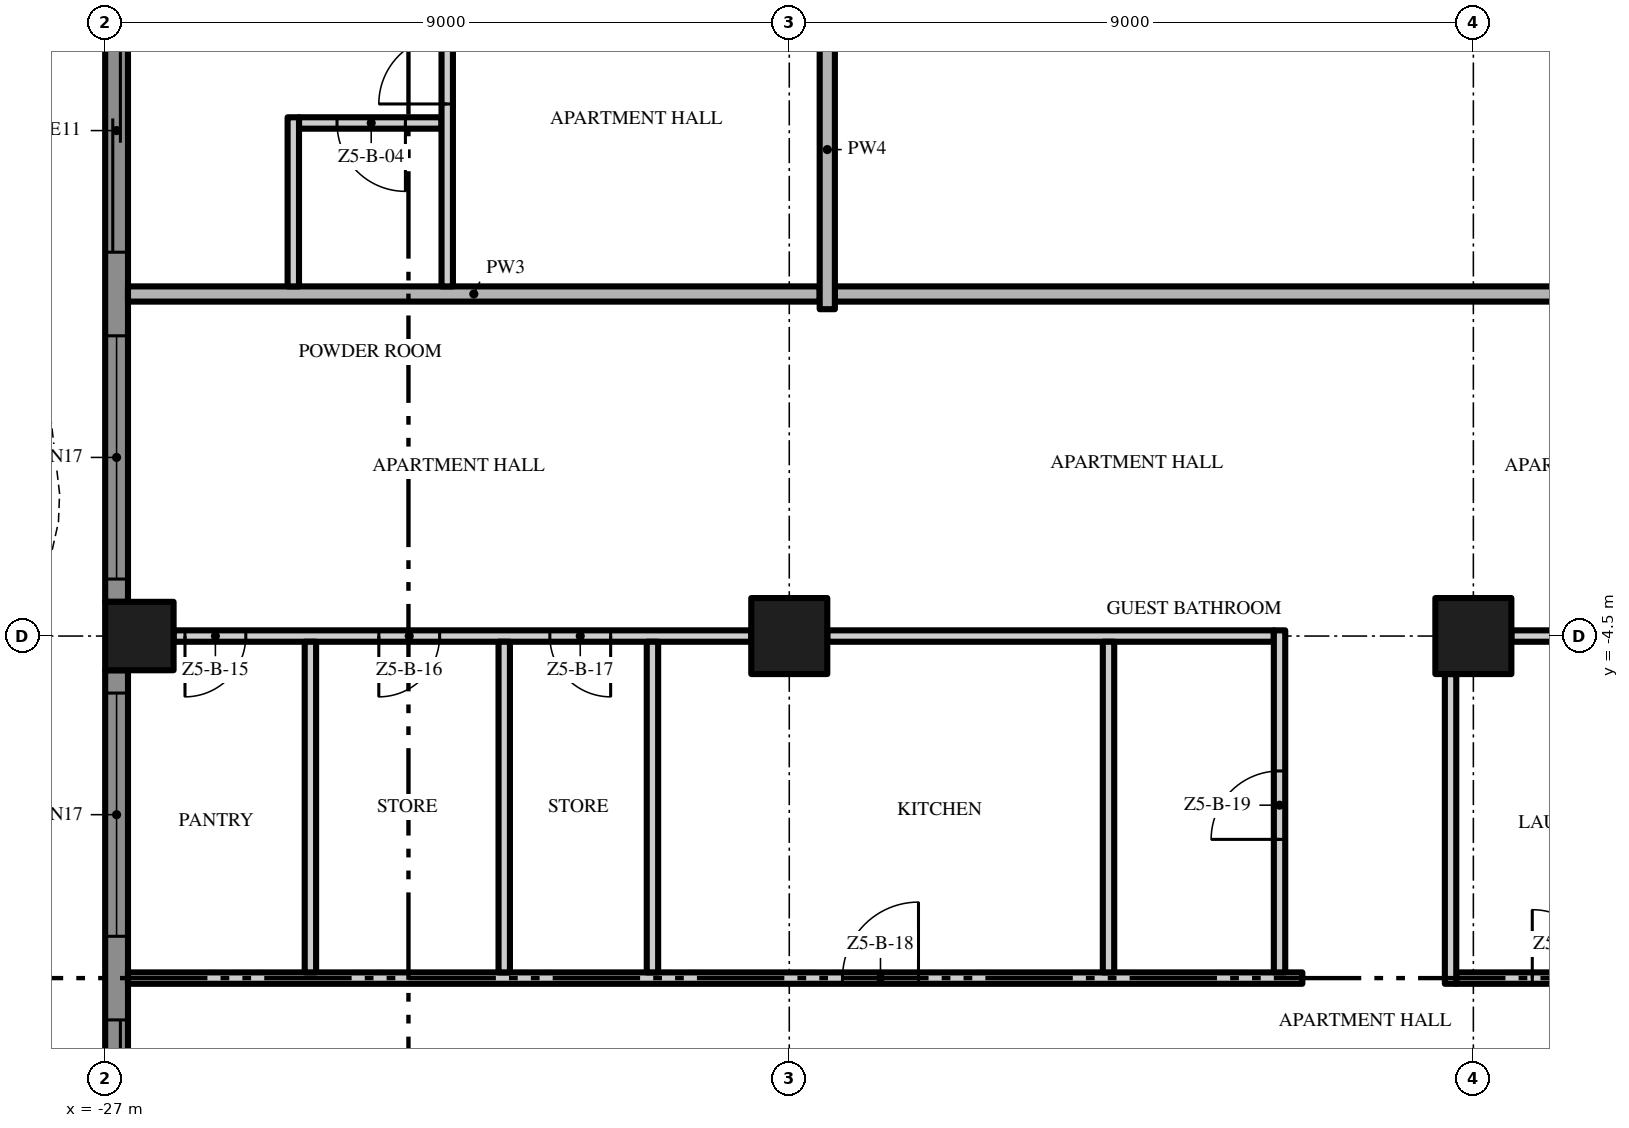
"""IFC4 building model, lengths in metres.
Left out: names, types, materials, properties, quantities, classifications, styles, units other than length and angle.
Written with IfcOpenShell. Run it as: python <this file> out.ifc"""

import sys

from ifc_helpers import new_model, si_unit, direction, frame, frame_2d, origin, origin_2d, place, context, subcontext, project, spatial, polyline, rectangle, outline, extrude, element, fill, save


model = new_model("IFC4")
c1 = context("Model", 3, precision=1e-05, world=origin(), true_north=direction((0.0, 1.0)))
c2 = subcontext(c1, "Body", "Model", "MODEL_VIEW")
j1 = project(units=[si_unit("LENGTHUNIT", "METRE"), si_unit("PLANEANGLEUNIT", "RADIAN")], contexts=[c1])
p1 = place(None, origin())
s1 = spatial("IfcSite", under=j1, at=p1, CompositionType="ELEMENT")
p2 = place(p1, origin())
s2 = spatial("IfcBuilding", under=s1, at=p2, CompositionType="ELEMENT")
p3 = place(p2, frame((0.0, 0.0, 254.0)))
s3 = spatial("IfcBuildingStorey", under=s2, at=p3, CompositionType="ELEMENT", Elevation=254.0)
p4 = place(p3, frame((-18.0, -4.5, 0.0), z_axis=(0.0, 0.0, 1.0), x_axis=(1.0, 0.0, 0.0)))
e1 = element("IfcColumn", 1, at=p4, inside=s3, PredefinedType="COLUMN", context=c2, shape_type="SweptSolid", body=[
    extrude(rectangle(XDim=1.0, YDim=1.0, at=origin_2d()), origin(), (0.0, 0.0, 1.0), 3.5),
])
p5 = place(p3, frame((-26.55, -4.5, 0.0), z_axis=(0.0, 0.0, 1.0), x_axis=(1.0, 0.0, 0.0)))
e2 = element("IfcColumn", 2, at=p5, inside=s3, PredefinedType="COLUMN", context=c2, shape_type="SweptSolid", body=[
    extrude(rectangle(XDim=0.9, YDim=0.9, at=origin_2d()), origin(), (0.0, 0.0, 1.0), 3.5),
])
p6 = place(p3, frame((-9.0, -4.5, 0.0), z_axis=(0.0, 0.0, 1.0), x_axis=(1.0, 0.0, 0.0)))
e3 = element("IfcColumn", 3, at=p6, inside=s3, PredefinedType="COLUMN", context=c2, shape_type="SweptSolid", body=[
    extrude(rectangle(XDim=1.0, YDim=1.0, at=origin_2d()), origin(), (0.0, 0.0, 1.0), 3.5),
])
p7 = place(p3, frame((-26.85, -4.05, 0.0), z_axis=(0.0, 0.0, 1.0), x_axis=(0.0, 1.0, 0.0)))
e4 = element("IfcWall", 4, at=p7, inside=s3, PredefinedType="SOLIDWALL", context=c2, shape_type="SweptSolid", body=[
    extrude(rectangle(XDim=8.1, YDim=0.3, at=frame_2d((4.05, 0.0))), origin(), (0.0, 0.0, 1.0), 3.5),
])
p8 = place(p7, frame((4.6, 0.0, 0.0)))
e5 = element("IfcOpeningElement", 5, at=p8, cuts=e4, PredefinedType="OPENING", context=c2, shape_type="SweptSolid", body=[
    extrude(rectangle(XDim=3.2, YDim=2.4, at=frame_2d((1.6, 1.2))), frame((0.0, 0.16, 0.0), z_axis=(0.0, -1.0, 0.0), x_axis=(1.0, 0.0, 0.0)), (0.0, 0.0, 1.0), 0.32),
])
p9 = place(p7, frame((0.3, 0.0, 0.45)))
e6 = element("IfcOpeningElement", 6, at=p9, cuts=e4, PredefinedType="OPENING", context=c2, shape_type="SweptSolid", body=[
    extrude(rectangle(XDim=3.2, YDim=2.65, at=frame_2d((1.6, 1.325))), frame((0.0, 0.16, 0.0), z_axis=(0.0, -1.0, 0.0), x_axis=(1.0, 0.0, 0.0)), (0.0, 0.0, 1.0), 0.32),
])
p10 = place(p3, frame((-26.85, -13.05, 0.0), z_axis=(0.0, 0.0, 1.0), x_axis=(0.0, 1.0, 0.0)))
e7 = element("IfcWall", 7, at=p10, inside=s3, PredefinedType="SOLIDWALL", context=c2, shape_type="SweptSolid", body=[
    extrude(rectangle(XDim=8.1, YDim=0.3, at=frame_2d((4.05, 0.0))), origin(), (0.0, 0.0, 1.0), 3.5),
])
p11 = place(p10, frame((4.6, 0.0, 0.45)))
e8 = element("IfcOpeningElement", 8, at=p11, cuts=e7, PredefinedType="OPENING", context=c2, shape_type="SweptSolid", body=[
    extrude(rectangle(XDim=3.2, YDim=2.65, at=frame_2d((1.6, 1.325))), frame((0.0, 0.16, 0.0), z_axis=(0.0, -1.0, 0.0), x_axis=(1.0, 0.0, 0.0)), (0.0, 0.0, 1.0), 0.32),
])
p12 = place(p10, frame((0.3, 0.0, 0.0)))
e9 = element("IfcOpeningElement", 9, at=p12, cuts=e7, PredefinedType="OPENING", context=c2, shape_type="SweptSolid", body=[
    extrude(rectangle(XDim=3.2, YDim=2.4, at=frame_2d((1.6, 1.2))), frame((0.0, 0.16, 0.0), z_axis=(0.0, -1.0, 0.0), x_axis=(1.0, 0.0, 0.0)), (0.0, 0.0, 1.0), 0.32),
])
p13 = place(p3, origin())
e10 = element("IfcWall", 10, at=p13, inside=s3, PredefinedType="USERDEFINED", context=c2, shape_type="SweptSolid", body=[
    extrude(outline(polyline([(-29.649, 18.0), (-28.988, 16.5), (-28.255, 15.0), (-27.731, 13.5), (-27.6, 12.375), (-27.615, 12.0), (-27.951, 10.5), (-28.612, 9.0), (-29.345, 7.5), (-29.869, 6.0), (-30.0, 4.875), (-29.985, 4.5), (-29.649, 3.0), (-28.988, 1.5), (-28.255, 0.0), (-27.731, -1.5), (-27.6, -2.625), (-27.615, -3.0), (-27.951, -4.5), (-28.612, -6.0), (-29.345, -7.5), (-29.869, -9.0), (-30.0, -10.125), (-29.985, -10.5), (-29.649, -12.0), (-28.988, -13.5), (-28.255, -15.0), (-27.731, -16.5), (-27.6, -17.625), (-27.615, -18.0), (-27.365, -18.01), (-27.349, -17.615), (-27.486, -16.444), (-28.024, -14.904), (-28.761, -13.395), (-29.41, -11.921), (-29.736, -10.467), (-29.749, -10.135), (-29.624, -9.056), (-29.114, -7.596), (-28.385, -6.105), (-27.713, -4.579), (-27.366, -3.033), (-27.349, -2.615), (-27.486, -1.444), (-28.024, 0.096), (-28.761, 1.605), (-29.41, 3.079), (-29.736, 4.533), (-29.749, 4.865), (-29.624, 5.944), (-29.114, 7.404), (-28.385, 8.895), (-27.713, 10.421), (-27.366, 11.967), (-27.349, 12.385), (-27.486, 13.556), (-28.024, 15.096), (-28.761, 16.605), (-29.42, 18.101), (-29.649, 18.0)])), origin(), (0.0, 0.0, 1.0), 0.9),
])
p14 = place(p3, frame((-26.7, -9.0, 0.0), z_axis=(0.0, 0.0, 1.0), x_axis=(1.0, 0.0, 0.0)))
e11 = element("IfcWall", 11, at=p14, inside=s3, PredefinedType="PARTITIONING", context=c2, shape_type="SweptSolid", body=[
    extrude(rectangle(XDim=15.45, YDim=0.15, at=frame_2d((7.725, 0.0))), origin(), (0.0, 0.0, 1.0), 3.5),
])
p15 = place(p14, frame((9.4, 0.0, 0.0)))
e12 = element("IfcOpeningElement", 12, at=p15, cuts=e11, PredefinedType="OPENING", context=c2, shape_type="SweptSolid", body=[
    extrude(rectangle(XDim=1.0, YDim=2.4, at=frame_2d((0.5, 1.2))), frame((0.0, 0.085, 0.0), z_axis=(0.0, -1.0, 0.0), x_axis=(1.0, 0.0, 0.0)), (0.0, 0.0, 1.0), 0.17),
])
p16 = place(p3, frame((-9.225, -9.0, 0.0), z_axis=(0.0, 0.0, 1.0), x_axis=(1.0, 0.0, 0.0)))
e13 = element("IfcWall", 13, at=p16, inside=s3, PredefinedType="PARTITIONING", context=c2, shape_type="SweptSolid", body=[
    extrude(rectangle(XDim=13.625, YDim=0.15, at=frame_2d((6.812, 0.0))), origin(), (0.0, 0.0, 1.0), 3.5),
])
p17 = place(p16, frame((1.0, 0.0, 0.0)))
e14 = element("IfcOpeningElement", 14, at=p17, cuts=e13, PredefinedType="OPENING", context=c2, shape_type="SweptSolid", body=[
    extrude(rectangle(XDim=0.9, YDim=2.1, at=frame_2d((0.45, 1.05))), frame((0.0, 0.085, 0.0), z_axis=(0.0, -1.0, 0.0), x_axis=(1.0, 0.0, 0.0)), (0.0, 0.0, 1.0), 0.17),
])
p18 = place(p16, frame((5.125, 0.0, 0.0)))
e15 = element("IfcOpeningElement", 15, at=p18, cuts=e13, PredefinedType="OPENING", context=c2, shape_type="SweptSolid", body=[
    extrude(rectangle(XDim=0.9, YDim=2.1, at=frame_2d((0.45, 1.05))), frame((0.0, 0.085, 0.0), z_axis=(0.0, -1.0, 0.0), x_axis=(1.0, 0.0, 0.0)), (0.0, 0.0, 1.0), 0.17),
])
p19 = place(p3, frame((-18.5, -4.5, 0.0), z_axis=(0.0, 0.0, 1.0), x_axis=(-1.0, 0.0, 0.0)))
e16 = element("IfcWall", 16, at=p19, inside=s3, PredefinedType="PARTITIONING", context=c2, shape_type="SweptSolid", body=[
    extrude(rectangle(XDim=7.6, YDim=0.15, at=frame_2d((3.8, 0.0))), origin(), (0.0, 0.0, 1.0), 3.5),
])
p20 = place(p19, frame((6.65, 0.0, 0.0)))
e17 = element("IfcOpeningElement", 17, at=p20, cuts=e16, PredefinedType="OPENING", context=c2, shape_type="SweptSolid", body=[
    extrude(rectangle(XDim=0.8, YDim=2.0, at=frame_2d((0.4, 1.0))), frame((0.0, 0.085, 0.0), z_axis=(0.0, -1.0, 0.0), x_axis=(1.0, 0.0, 0.0)), (0.0, 0.0, 1.0), 0.17),
])
p21 = place(p19, frame((4.1, 0.0, 0.0)))
e18 = element("IfcOpeningElement", 18, at=p21, cuts=e16, PredefinedType="OPENING", context=c2, shape_type="SweptSolid", body=[
    extrude(rectangle(XDim=0.8, YDim=2.0, at=frame_2d((0.4, 1.0))), frame((0.0, 0.085, 0.0), z_axis=(0.0, -1.0, 0.0), x_axis=(1.0, 0.0, 0.0)), (0.0, 0.0, 1.0), 0.17),
])
p22 = place(p19, frame((1.85, 0.0, 0.0)))
e19 = element("IfcOpeningElement", 19, at=p22, cuts=e16, PredefinedType="OPENING", context=c2, shape_type="SweptSolid", body=[
    extrude(rectangle(XDim=0.8, YDim=2.0, at=frame_2d((0.4, 1.0))), frame((0.0, 0.085, 0.0), z_axis=(0.0, -1.0, 0.0), x_axis=(1.0, 0.0, 0.0)), (0.0, 0.0, 1.0), 0.17),
])
p23 = place(p3, frame((-17.5, -4.5, 0.0), z_axis=(0.0, 0.0, 1.0), x_axis=(1.0, 0.0, 0.0)))
e20 = element("IfcWall", 20, at=p23, inside=s3, PredefinedType="PARTITIONING", context=c2, shape_type="SweptSolid", body=[
    extrude(rectangle(XDim=5.875, YDim=0.15, at=frame_2d((2.938, 0.0))), origin(), (0.0, 0.0, 1.0), 3.5),
])
p24 = place(p3, frame((-8.5, -4.5, 0.0), z_axis=(0.0, 0.0, 1.0), x_axis=(1.0, 0.0, 0.0)))
e21 = element("IfcWall", 21, at=p24, inside=s3, PredefinedType="PARTITIONING", context=c2, shape_type="SweptSolid", body=[
    extrude(rectangle(XDim=8.0, YDim=0.15, at=frame_2d((4.0, 0.0))), origin(), (0.0, 0.0, 1.0), 3.5),
])
p25 = place(p3, frame((17.4, 0.0, 0.0), z_axis=(0.0, 0.0, 1.0), x_axis=(-1.0, 0.0, 0.0)))
e22 = element("IfcWall", 22, at=p25, inside=s3, PredefinedType="PARTITIONING", context=c2, shape_type="SweptSolid", body=[
    extrude(rectangle(XDim=34.8, YDim=0.2, at=frame_2d((17.4, 0.0))), origin(), (0.0, 0.0, 1.0), 3.5),
])
p26 = place(p25, frame((23.4, 0.0, 0.0)))
e23 = element("IfcOpeningElement", 23, at=p26, cuts=e22, PredefinedType="OPENING", context=c2, shape_type="SweptSolid", body=[
    extrude(rectangle(XDim=1.5, YDim=2.4, at=frame_2d((0.75, 1.2))), frame((0.0, 0.11, 0.0), z_axis=(0.0, -1.0, 0.0), x_axis=(1.0, 0.0, 0.0)), (0.0, 0.0, 1.0), 0.22),
])
p27 = place(p25, frame((5.4, 0.0, 0.0)))
e24 = element("IfcOpeningElement", 24, at=p27, cuts=e22, PredefinedType="OPENING", context=c2, shape_type="SweptSolid", body=[
    extrude(rectangle(XDim=1.5, YDim=2.4, at=frame_2d((0.75, 1.2))), frame((0.0, 0.11, 0.0), z_axis=(0.0, -1.0, 0.0), x_axis=(1.0, 0.0, 0.0)), (0.0, 0.0, 1.0), 0.22),
])
p28 = place(p3, frame((-26.7, 0.0, 0.0), z_axis=(0.0, 0.0, 1.0), x_axis=(1.0, 0.0, 0.0)))
e25 = element("IfcWall", 25, at=p28, inside=s3, PredefinedType="PARTITIONING", context=c2, shape_type="SweptSolid", body=[
    extrude(rectangle(XDim=9.1, YDim=0.2, at=frame_2d((4.55, 0.0))), origin(), (0.0, 0.0, 1.0), 3.5),
])
p29 = place(p3, frame((-22.575, 2.25, 0.0), z_axis=(0.0, 0.0, 1.0), x_axis=(-1.0, 0.0, 0.0)))
e26 = element("IfcWall", 26, at=p29, inside=s3, PredefinedType="PARTITIONING", context=c2, shape_type="SweptSolid", body=[
    extrude(rectangle(XDim=1.875, YDim=0.15, at=frame_2d((0.938, 0.0))), origin(), (0.0, 0.0, 1.0), 3.5),
])
p30 = place(p29, frame((0.475, 0.0, 0.0)))
e27 = element("IfcOpeningElement", 27, at=p30, cuts=e26, PredefinedType="OPENING", context=c2, shape_type="SweptSolid", body=[
    extrude(rectangle(XDim=0.9, YDim=2.1, at=frame_2d((0.45, 1.05))), frame((0.0, 0.085, 0.0), z_axis=(0.0, -1.0, 0.0), x_axis=(1.0, 0.0, 0.0)), (0.0, 0.0, 1.0), 0.17),
])
p31 = place(p3, frame((-24.525, 0.1, 0.0), z_axis=(0.0, 0.0, 1.0), x_axis=(0.0, 1.0, 0.0)))
e28 = element("IfcWall", 28, at=p31, inside=s3, PredefinedType="PARTITIONING", context=c2, shape_type="SweptSolid", body=[
    extrude(rectangle(XDim=2.225, YDim=0.15, at=frame_2d((1.113, 0.0))), origin(), (0.0, 0.0, 1.0), 3.5),
])
p32 = place(p3, frame((-24.3, -8.925, 0.0), z_axis=(0.0, 0.0, 1.0), x_axis=(0.0, 1.0, 0.0)))
e29 = element("IfcWall", 29, at=p32, inside=s3, PredefinedType="PARTITIONING", context=c2, shape_type="SweptSolid", body=[
    extrude(rectangle(XDim=4.35, YDim=0.15, at=frame_2d((2.175, 0.0))), origin(), (0.0, 0.0, 1.0), 3.5),
])
p33 = place(p3, frame((-22.5, 0.1, 0.0), z_axis=(0.0, 0.0, 1.0), x_axis=(0.0, 1.0, 0.0)))
e30 = element("IfcWall", 30, at=p33, inside=s3, PredefinedType="PARTITIONING", context=c2, shape_type="SweptSolid", body=[
    extrude(rectangle(XDim=17.45, YDim=0.15, at=frame_2d((8.725, 0.0))), origin(), (0.0, 0.0, 1.0), 3.5),
])
p34 = place(p33, frame((2.4, 0.0, 0.0)))
e31 = element("IfcOpeningElement", 31, at=p34, cuts=e30, PredefinedType="OPENING", context=c2, shape_type="SweptSolid", body=[
    extrude(rectangle(XDim=1.8, YDim=2.4, at=frame_2d((0.9, 1.2))), frame((0.0, 0.085, 0.0), z_axis=(0.0, -1.0, 0.0), x_axis=(1.0, 0.0, 0.0)), (0.0, 0.0, 1.0), 0.17),
])
p35 = place(p33, frame((10.65, 0.0, 0.0)))
e32 = element("IfcOpeningElement", 32, at=p35, cuts=e30, PredefinedType="OPENING", context=c2, shape_type="SweptSolid", body=[
    extrude(rectangle(XDim=1.0, YDim=2.4, at=frame_2d((0.5, 1.2))), frame((0.0, 0.085, 0.0), z_axis=(0.0, -1.0, 0.0), x_axis=(1.0, 0.0, 0.0)), (0.0, 0.0, 1.0), 0.17),
])
for number, where, z_axis, x_axis in (
    (33, (-21.75, -8.925, 0.0), (0.0, 0.0, 1.0), (0.0, 1.0, 0.0)),
    (34, (-19.8, -8.925, 0.0), (0.0, 0.0, 1.0), (0.0, 1.0, 0.0)),
):
    element("IfcWall", number, at=place(p3, frame(where, z_axis=z_axis, x_axis=x_axis)), inside=s3, PredefinedType="PARTITIONING", context=c2, shape_type="SweptSolid", body=[
        extrude(rectangle(XDim=4.35, YDim=0.15, at=frame_2d((2.175, 0.0))), origin(), (0.0, 0.0, 1.0), 3.5),
    ])
p36 = place(p3, frame((-17.5, -0.2, 0.0), z_axis=(0.0, 0.0, 1.0), x_axis=(0.0, 1.0, 0.0)))
e35 = element("IfcWall", 35, at=p36, inside=s3, PredefinedType="PARTITIONING", context=c2, shape_type="SweptSolid", body=[
    extrude(rectangle(XDim=4.2, YDim=0.2, at=frame_2d((2.1, 0.0))), origin(), (0.0, 0.0, 1.0), 3.5),
])
p37 = place(p3, frame((-13.8, -8.925, 0.0), z_axis=(0.0, 0.0, 1.0), x_axis=(0.0, 1.0, 0.0)))
e36 = element("IfcWall", 36, at=p37, inside=s3, PredefinedType="PARTITIONING", context=c2, shape_type="SweptSolid", body=[
    extrude(rectangle(XDim=4.35, YDim=0.15, at=frame_2d((2.175, 0.0))), origin(), (0.0, 0.0, 1.0), 3.5),
])
p38 = place(p3, frame((-11.55, -8.925, 0.0), z_axis=(0.0, 0.0, 1.0), x_axis=(0.0, 1.0, 0.0)))
e37 = element("IfcWall", 37, at=p38, inside=s3, PredefinedType="PARTITIONING", context=c2, shape_type="SweptSolid", body=[
    extrude(rectangle(XDim=4.5, YDim=0.15, at=frame_2d((2.25, 0.0))), origin(), (0.0, 0.0, 1.0), 3.5),
])
p39 = place(p38, frame((1.75, 0.0, 0.0)))
e38 = element("IfcOpeningElement", 38, at=p39, cuts=e37, PredefinedType="OPENING", context=c2, shape_type="SweptSolid", body=[
    extrude(rectangle(XDim=0.9, YDim=2.1, at=frame_2d((0.45, 1.05))), frame((0.0, 0.085, 0.0), z_axis=(0.0, -1.0, 0.0), x_axis=(1.0, 0.0, 0.0)), (0.0, 0.0, 1.0), 0.17),
])
p40 = place(p3, frame((-9.3, -9.075, 0.0), z_axis=(0.0, 0.0, 1.0), x_axis=(0.0, 1.0, 0.0)))
e39 = element("IfcWall", 39, at=p40, inside=s3, PredefinedType="PARTITIONING", context=c2, shape_type="SweptSolid", body=[
    extrude(rectangle(XDim=4.075, YDim=0.15, at=frame_2d((2.038, 0.0))), origin(), (0.0, 0.0, 1.0), 3.5),
])
p41 = place(p8, origin())
e40 = element("IfcDoor", 40, at=p41, inside=s3, OperationType="SINGLE_SWING_LEFT", PredefinedType="DOOR", context=c2, shape_type="SweptSolid", body=[
    extrude(rectangle(XDim=3.2, YDim=2.4, at=frame_2d((1.6, 1.2))), frame((0.0, 0.025, 0.0), z_axis=(0.0, -1.0, 0.0), x_axis=(1.0, 0.0, 0.0)), (0.0, 0.0, 1.0), 0.05),
])
fill(e5, e40)
p42 = place(p9, origin())
e41 = element("IfcWindow", 41, at=p42, inside=s3, PartitioningType="SINGLE_PANEL", PredefinedType="WINDOW", context=c2, shape_type="SweptSolid", body=[
    extrude(rectangle(XDim=3.2, YDim=2.65, at=frame_2d((1.6, 1.325))), frame((0.0, 0.03, 0.0), z_axis=(0.0, -1.0, 0.0), x_axis=(1.0, 0.0, 0.0)), (0.0, 0.0, 1.0), 0.06),
])
fill(e6, e41)
p43 = place(p11, origin())
e42 = element("IfcWindow", 42, at=p43, inside=s3, PartitioningType="SINGLE_PANEL", PredefinedType="WINDOW", context=c2, shape_type="SweptSolid", body=[
    extrude(rectangle(XDim=3.2, YDim=2.65, at=frame_2d((1.6, 1.325))), frame((0.0, 0.03, 0.0), z_axis=(0.0, -1.0, 0.0), x_axis=(1.0, 0.0, 0.0)), (0.0, 0.0, 1.0), 0.06),
])
fill(e8, e42)
p44 = place(p12, origin())
e43 = element("IfcDoor", 43, at=p44, inside=s3, OperationType="SINGLE_SWING_LEFT", PredefinedType="DOOR", context=c2, shape_type="SweptSolid", body=[
    extrude(rectangle(XDim=3.2, YDim=2.4, at=frame_2d((1.6, 1.2))), frame((0.0, 0.025, 0.0), z_axis=(0.0, -1.0, 0.0), x_axis=(1.0, 0.0, 0.0)), (0.0, 0.0, 1.0), 0.05),
])
fill(e9, e43)
p45 = place(p34, origin())
e44 = element("IfcDoor", 44, at=p45, inside=s3, OperationType="DOUBLE_DOOR_SINGLE_SWING", PredefinedType="DOOR", context=c2, shape_type="SweptSolid", body=[
    extrude(rectangle(XDim=1.8, YDim=2.4, at=frame_2d((0.9, 1.2))), frame((0.0, 0.025, 0.0), z_axis=(0.0, -1.0, 0.0), x_axis=(1.0, 0.0, 0.0)), (0.0, 0.0, 1.0), 0.05),
])
fill(e31, e44)
p46 = place(p30, origin())
e45 = element("IfcDoor", 45, at=p46, inside=s3, OperationType="SINGLE_SWING_LEFT", PredefinedType="DOOR", context=c2, shape_type="SweptSolid", body=[
    extrude(rectangle(XDim=0.9, YDim=2.1, at=frame_2d((0.45, 1.05))), frame((0.0, 0.025, 0.0), z_axis=(0.0, -1.0, 0.0), x_axis=(1.0, 0.0, 0.0)), (0.0, 0.0, 1.0), 0.05),
])
fill(e27, e45)
p47 = place(p20, origin())
e46 = element("IfcDoor", 46, at=p47, inside=s3, OperationType="SINGLE_SWING_RIGHT", PredefinedType="DOOR", context=c2, shape_type="SweptSolid", body=[
    extrude(rectangle(XDim=0.8, YDim=2.0, at=frame_2d((0.4, 1.0))), frame((0.0, 0.025, 0.0), z_axis=(0.0, -1.0, 0.0), x_axis=(1.0, 0.0, 0.0)), (0.0, 0.0, 1.0), 0.05),
])
fill(e17, e46)
p48 = place(p21, origin())
e47 = element("IfcDoor", 47, at=p48, inside=s3, OperationType="SINGLE_SWING_RIGHT", PredefinedType="DOOR", context=c2, shape_type="SweptSolid", body=[
    extrude(rectangle(XDim=0.8, YDim=2.0, at=frame_2d((0.4, 1.0))), frame((0.0, 0.025, 0.0), z_axis=(0.0, -1.0, 0.0), x_axis=(1.0, 0.0, 0.0)), (0.0, 0.0, 1.0), 0.05),
])
fill(e18, e47)
p49 = place(p22, origin())
e48 = element("IfcDoor", 48, at=p49, inside=s3, OperationType="SINGLE_SWING_LEFT", PredefinedType="DOOR", context=c2, shape_type="SweptSolid", body=[
    extrude(rectangle(XDim=0.8, YDim=2.0, at=frame_2d((0.4, 1.0))), frame((0.0, 0.025, 0.0), z_axis=(0.0, -1.0, 0.0), x_axis=(1.0, 0.0, 0.0)), (0.0, 0.0, 1.0), 0.05),
])
fill(e19, e48)
p50 = place(p15, origin())
e49 = element("IfcDoor", 49, at=p50, inside=s3, OperationType="SINGLE_SWING_RIGHT", PredefinedType="DOOR", context=c2, shape_type="SweptSolid", body=[
    extrude(rectangle(XDim=1.0, YDim=2.4, at=frame_2d((0.5, 1.2))), frame((0.0, 0.025, 0.0), z_axis=(0.0, -1.0, 0.0), x_axis=(1.0, 0.0, 0.0)), (0.0, 0.0, 1.0), 0.05),
])
fill(e12, e49)
p51 = place(p39, origin())
e50 = element("IfcDoor", 50, at=p51, inside=s3, OperationType="SINGLE_SWING_LEFT", PredefinedType="DOOR", context=c2, shape_type="SweptSolid", body=[
    extrude(rectangle(XDim=0.9, YDim=2.1, at=frame_2d((0.45, 1.05))), frame((0.0, 0.025, 0.0), z_axis=(0.0, -1.0, 0.0), x_axis=(1.0, 0.0, 0.0)), (0.0, 0.0, 1.0), 0.05),
])
fill(e38, e50)
p52 = place(p17, origin())
e51 = element("IfcDoor", 51, at=p52, inside=s3, OperationType="SINGLE_SWING_LEFT", PredefinedType="DOOR", context=c2, shape_type="SweptSolid", body=[
    extrude(rectangle(XDim=0.9, YDim=2.1, at=frame_2d((0.45, 1.05))), frame((0.0, 0.025, 0.0), z_axis=(0.0, -1.0, 0.0), x_axis=(1.0, 0.0, 0.0)), (0.0, 0.0, 1.0), 0.05),
])
fill(e14, e51)
save(model, sys.argv[1])
